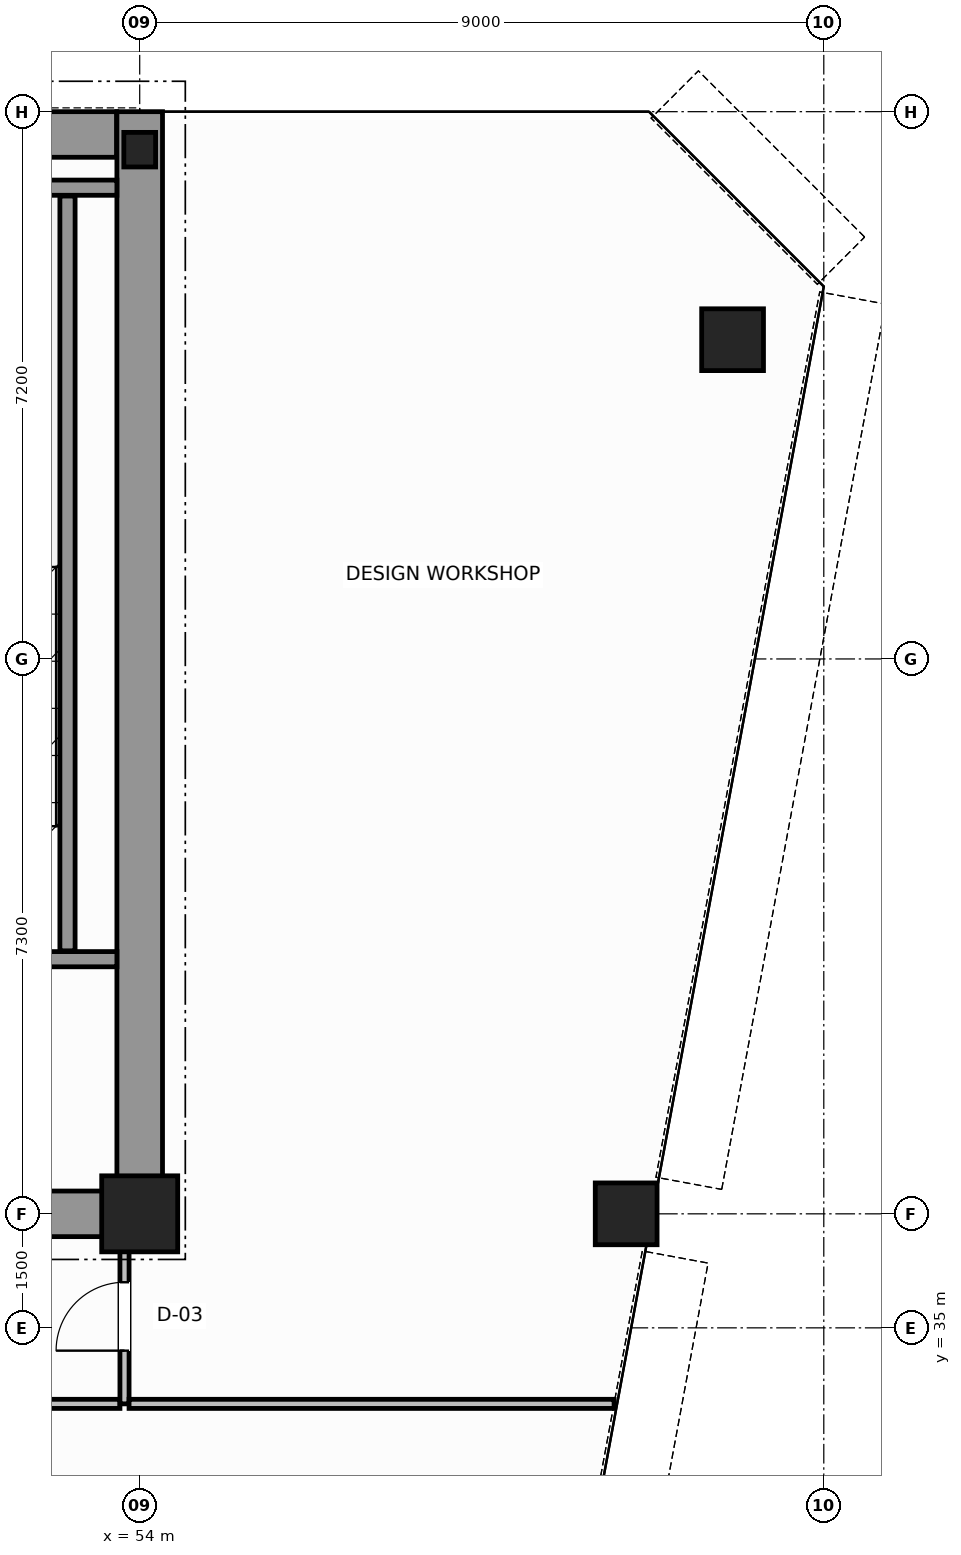
"""IFC4 building model, lengths in metres.
Left out: names, types, materials, properties, quantities, classifications, styles, units other than length and angle.
Written with IfcOpenShell. Run it as: python <this file> out.ifc"""

import sys

from ifc_helpers import new_model, si_unit, direction, frame, frame_2d, origin, origin_2d, place, context, subcontext, project, spatial, rectangle, hollow_circle, i_section, extrude, source, transform, mapped, element, fill, save


model = new_model("IFC4")
c1 = context("Model", 3, precision=1e-05, world=origin(), true_north=direction((0.0, 1.0)))
c2 = subcontext(c1, "Body", "Model", "MODEL_VIEW")
j1 = project(units=[si_unit("LENGTHUNIT", "METRE"), si_unit("PLANEANGLEUNIT", "RADIAN")], contexts=[c1])
p1 = place(None, origin())
s1 = spatial("IfcSite", under=j1, at=p1, CompositionType="ELEMENT")
p2 = place(p1, origin())
s2 = spatial("IfcBuilding", under=s1, at=p2, CompositionType="ELEMENT")
p3 = place(p2, frame((0.0, 0.0, 223.2)))
s3 = spatial("IfcBuildingStorey", under=s2, at=p3, CompositionType="ELEMENT", Elevation=223.2)
m1 = source(origin(), c2, "Body", "SweptSolid", [
    extrude(rectangle(XDim=1.0, YDim=1.0, at=origin_2d()), origin(), (0.0, 0.0, 1.0), 3.8),
])
p4 = place(p3, frame((54.0, 36.5, 0.0), z_axis=(0.0, 0.0, 1.0), x_axis=(1.0, 0.0, 0.0)))
e1 = element("IfcColumn", 1, at=p4, inside=s3, PredefinedType="COLUMN", context=c2, shape_type="MappedRepresentation", body=[
    mapped(m1, transform((0.0, 0.0, 0.0), scale=1.0)),
])
m2 = source(origin(), c2, "Body", "SweptSolid", [
    extrude(i_section(OverallWidth=0.418, OverallDepth=0.455, WebThickness=0.042, FlangeThickness=0.058, FilletRadius=0.015, at=origin_2d()), origin(), (0.0, 0.0, 1.0), 3.8),
])
p5 = place(p3, frame((54.0, 50.5, 0.0), z_axis=(0.0, 0.0, 1.0), x_axis=(1.0, 0.0, 0.0)))
e2 = element("IfcColumn", 2, at=p5, inside=s3, PredefinedType="COLUMN", context=c2, shape_type="MappedRepresentation", body=[
    mapped(m2, transform((0.0, 0.0, 0.0), scale=1.0)),
])
m3 = source(origin(), c2, "Body", "SweptSolid", [
    extrude(hollow_circle(Radius=0.406, WallThickness=0.04, at=origin_2d()), origin(), (0.0, 0.0, 1.0), 3.8),
])
for number, where, z_axis, x_axis in (
    (3, (61.8, 48.0, 0.0), (0.0, 0.0, 1.0), (1.0, 0.0, 0.0)),
    (4, (60.4, 36.5, 0.0), (0.0, 0.0, 1.0), (1.0, 0.0, 0.0)),
):
    element("IfcColumn", number, at=place(p3, frame(where, z_axis=z_axis, x_axis=x_axis)), inside=s3, PredefinedType="COLUMN", context=c2, shape_type="MappedRepresentation", body=[
        mapped(m3, transform((0.0, 0.0, 0.0), scale=1.0)),
    ])
p6 = place(p3, frame((34.002, 50.7, 0.0), z_axis=(0.0, 0.0, 1.0), x_axis=(1.0, 0.0, 0.0)))
e5 = element("IfcWall", 5, at=p6, inside=s3, PredefinedType="SHEAR", context=c2, shape_type="SweptSolid", body=[
    extrude(rectangle(XDim=19.694, YDim=0.6, at=frame_2d((9.847, 0.0))), origin(), (0.0, 0.0, 1.0), 3.8),
])
p7 = place(p3, frame((54.0, 36.5, 0.0), z_axis=(0.0, 0.0, 1.0), x_axis=(0.0, 1.0, 0.0)))
e6 = element("IfcWall", 6, at=p7, inside=s3, PredefinedType="SHEAR", context=c2, shape_type="SweptSolid", body=[
    extrude(rectangle(XDim=14.5, YDim=0.6, at=frame_2d((7.25, 0.0))), origin(), (0.0, 0.0, 1.0), 3.8),
])
p8 = place(p3, frame((49.8, 36.5, 0.0), z_axis=(0.0, 0.0, 1.0), x_axis=(1.0, 0.0, 0.0)))
e7 = element("IfcWall", 7, at=p8, inside=s3, PredefinedType="SHEAR", context=c2, shape_type="SweptSolid", body=[
    extrude(rectangle(XDim=3.88, YDim=0.6, at=frame_2d((1.94, 0.0))), origin(), (0.0, 0.0, 1.0), 2.58),
])
p9 = place(p3, frame((49.4, 39.85, 0.0), z_axis=(0.0, 0.0, 1.0), x_axis=(1.0, 0.0, 0.0)))
e8 = element("IfcWall", 8, at=p9, inside=s3, PredefinedType="SOLIDWALL", context=c2, shape_type="SweptSolid", body=[
    extrude(rectangle(XDim=4.3, YDim=0.2, at=frame_2d((2.15, 0.0))), origin(), (0.0, 0.0, 1.0), 3.8),
])
p10 = place(p9, frame((1.325, 0.0, 0.0)))
e9 = element("IfcOpeningElement", 9, at=p10, cuts=e8, PredefinedType="OPENING", context=c2, shape_type="SweptSolid", body=[
    extrude(rectangle(XDim=1.1, YDim=2.15, at=frame_2d((0.55, 1.075))), frame((0.0, 0.11, 0.0), z_axis=(0.0, -1.0, 0.0), x_axis=(1.0, 0.0, 0.0)), (0.0, 0.0, 1.0), 0.22),
])
p11 = place(p3, frame((49.4, 50.0, 0.0), z_axis=(0.0, 0.0, 1.0), x_axis=(1.0, 0.0, 0.0)))
e10 = element("IfcWall", 10, at=p11, inside=s3, PredefinedType="SOLIDWALL", context=c2, shape_type="SweptSolid", body=[
    extrude(rectangle(XDim=4.3, YDim=0.2, at=frame_2d((2.15, 0.0))), origin(), (0.0, 0.0, 1.0), 3.8),
])
p12 = place(p3, frame((53.05, 39.96, 0.0), z_axis=(0.0, 0.0, 1.0), x_axis=(0.0, 1.0, 0.0)))
e11 = element("IfcWall", 11, at=p12, inside=s3, PredefinedType="SOLIDWALL", context=c2, shape_type="SweptSolid", body=[
    extrude(rectangle(XDim=9.93, YDim=0.2, at=frame_2d((4.965, 0.0))), origin(), (0.0, 0.0, 1.0), 3.8),
])
p13 = place(p3, frame((36.26, 34.0, 0.0), z_axis=(0.0, 0.0, 1.0), x_axis=(1.0, 0.0, 0.0)))
e12 = element("IfcWall", 12, at=p13, inside=s3, PredefinedType="PARTITIONING", context=c2, shape_type="SweptSolid", body=[
    extrude(rectangle(XDim=17.48, YDim=0.12, at=frame_2d((8.74, 0.0))), origin(), (0.0, 0.0, 1.0), 3.58),
])
p14 = place(p3, frame((53.8, 34.0, 0.0), z_axis=(0.0, 0.0, 1.0), x_axis=(0.0, 1.0, 0.0)))
e13 = element("IfcWall", 13, at=p14, inside=s3, PredefinedType="PARTITIONING", context=c2, shape_type="SweptSolid", body=[
    extrude(rectangle(XDim=2.44, YDim=0.12, at=frame_2d((1.22, 0.0))), origin(), (0.0, 0.0, 1.0), 3.58),
])
p15 = place(p14, frame((0.7, 0.0, 0.0)))
e14 = element("IfcOpeningElement", 14, at=p15, cuts=e13, PredefinedType="OPENING", context=c2, shape_type="SweptSolid", body=[
    extrude(rectangle(XDim=0.9, YDim=2.15, at=frame_2d((0.45, 1.075))), frame((0.0, 0.07, 0.0), z_axis=(0.0, -1.0, 0.0), x_axis=(1.0, 0.0, 0.0)), (0.0, 0.0, 1.0), 0.14),
])
p16 = place(p3, frame((53.86, 34.0, 0.0), z_axis=(0.0, 0.0, 1.0), x_axis=(1.0, 0.0, 0.0)))
e15 = element("IfcWall", 15, at=p16, inside=s3, PredefinedType="PARTITIONING", context=c2, shape_type="SweptSolid", body=[
    extrude(rectangle(XDim=6.381, YDim=0.12, at=frame_2d((3.19, 0.0))), origin(), (0.0, 0.0, 1.0), 3.58),
])
m4 = source(origin(), c2, "Body", "SweptSolid", [
    extrude(rectangle(XDim=0.9, YDim=2.15, at=frame_2d((0.45, 1.075))), frame((0.0, 0.025, 0.0), z_axis=(0.0, -1.0, 0.0), x_axis=(1.0, 0.0, 0.0)), (0.0, 0.0, 1.0), 0.05),
])
p17 = place(p15, origin())
e16 = element("IfcDoor", 16, at=p17, inside=s3, OperationType="SINGLE_SWING_RIGHT", PredefinedType="DOOR", context=c2, shape_type="MappedRepresentation", body=[
    mapped(m4, transform((0.0, 0.0, 0.0), scale=1.0)),
])
fill(e14, e16)
save(model, sys.argv[1])
